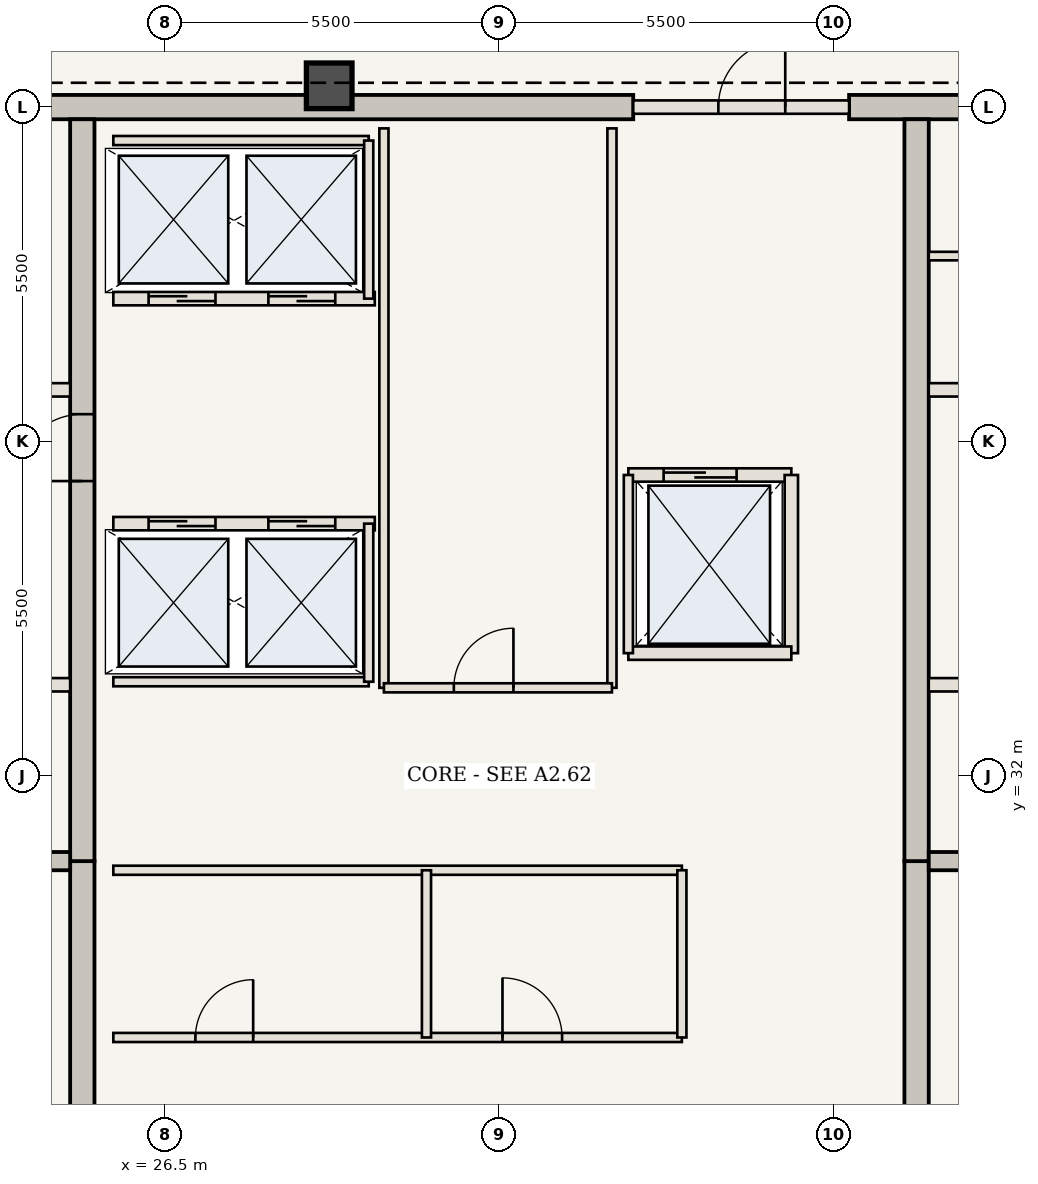
"""IFC4 building model, lengths in metres.
Left out: names, types, materials, properties, quantities, classifications, styles, units other than length and angle.
Written with IfcOpenShell. Run it as: python <this file> out.ifc"""

import sys

from ifc_helpers import new_model, si_unit, direction, frame, frame_2d, origin, origin_2d, place, context, subcontext, project, spatial, rectangle, extrude, element, fill, save


model = new_model("IFC4")
c1 = context("Model", 3, precision=1e-05, world=origin(), true_north=direction((0.0, 1.0)))
c2 = subcontext(c1, "Body", "Model", "MODEL_VIEW")
j1 = project(units=[si_unit("LENGTHUNIT", "METRE"), si_unit("PLANEANGLEUNIT", "RADIAN")], contexts=[c1])
p1 = place(None, origin())
s1 = spatial("IfcSite", under=j1, at=p1, CompositionType="ELEMENT")
p2 = place(p1, origin())
s2 = spatial("IfcBuilding", under=s1, at=p2, CompositionType="ELEMENT")
p3 = place(p2, frame((0.0, 0.0, 289.1)))
s3 = spatial("IfcBuildingStorey", under=s2, at=p3, CompositionType="ELEMENT", Elevation=289.1)
p4 = place(p3, frame((21.41, 43.0, 0.0), z_axis=(0.0, 0.0, 1.0), x_axis=(1.0, 0.0, 0.0)))
e1 = element("IfcWall", 1, at=p4, inside=s3, PredefinedType="SHEAR", context=c2, shape_type="SweptSolid", body=[
    extrude(rectangle(XDim=12.79, YDim=0.4, at=frame_2d((6.395, 0.0))), origin(), (0.0, 0.0, 1.0), 3.85),
])
p5 = place(p3, frame((37.75, 43.0, 0.0), z_axis=(0.0, 0.0, 1.0), x_axis=(1.0, 0.0, 0.0)))
e2 = element("IfcWall", 2, at=p5, inside=s3, PredefinedType="SHEAR", context=c2, shape_type="SweptSolid", body=[
    extrude(rectangle(XDim=4.84, YDim=0.4, at=frame_2d((2.42, 0.0))), origin(), (0.0, 0.0, 1.0), 3.85),
])
p6 = place(p3, frame((25.14, 21.15, 0.0), z_axis=(0.0, 0.0, 1.0), x_axis=(0.0, 1.0, 0.0)))
e3 = element("IfcWall", 3, at=p6, inside=s3, PredefinedType="SHEAR", context=c2, shape_type="SweptSolid", body=[
    extrude(rectangle(XDim=9.45, YDim=0.4, at=frame_2d((4.725, 0.0))), origin(), (0.0, 0.0, 1.0), 3.85),
])
p7 = place(p3, frame((25.14, 30.6, 0.0), z_axis=(0.0, 0.0, 1.0), x_axis=(0.0, 1.0, 0.0)))
e4 = element("IfcWall", 4, at=p7, inside=s3, PredefinedType="SHEAR", context=c2, shape_type="SweptSolid", body=[
    extrude(rectangle(XDim=12.2, YDim=0.4, at=frame_2d((6.1, 0.0))), origin(), (0.0, 0.0, 1.0), 3.85),
])
p8 = place(p7, frame((6.25, 0.0, 0.0)))
e5 = element("IfcOpeningElement", 5, at=p8, cuts=e4, PredefinedType="OPENING", context=c2, shape_type="SweptSolid", body=[
    extrude(rectangle(XDim=1.1, YDim=2.15, at=frame_2d((0.55, 1.075))), frame((0.0, 0.21, 0.0), z_axis=(0.0, -1.0, 0.0), x_axis=(1.0, 0.0, 0.0)), (0.0, 0.0, 1.0), 0.42),
])
p9 = place(p3, frame((38.86, 21.15, 0.0), z_axis=(0.0, 0.0, 1.0), x_axis=(0.0, 1.0, 0.0)))
e6 = element("IfcWall", 6, at=p9, inside=s3, PredefinedType="SHEAR", context=c2, shape_type="SweptSolid", body=[
    extrude(rectangle(XDim=9.45, YDim=0.4, at=frame_2d((4.725, 0.0))), origin(), (0.0, 0.0, 1.0), 3.85),
])
p10 = place(p3, frame((38.86, 30.6, 0.0), z_axis=(0.0, 0.0, 1.0), x_axis=(0.0, 1.0, 0.0)))
e7 = element("IfcWall", 7, at=p10, inside=s3, PredefinedType="SHEAR", context=c2, shape_type="SweptSolid", body=[
    extrude(rectangle(XDim=12.2, YDim=0.4, at=frame_2d((6.1, 0.0))), origin(), (0.0, 0.0, 1.0), 3.85),
])
p11 = place(p3, frame((29.2, 43.35, 0.0), z_axis=(0.0, 0.0, 1.0), x_axis=(1.0, 0.0, 0.0)))
e8 = element("IfcColumn", 8, at=p11, inside=s3, PredefinedType="COLUMN", context=c2, shape_type="SweptSolid", body=[
    extrude(rectangle(XDim=0.75, YDim=0.75, at=origin_2d()), origin(), (0.0, 0.0, 1.0), 3.85),
])
for number, where, z_axis, x_axis in (
    (9, (21.41, 30.6, 0.0), (0.0, 0.0, 1.0), (1.0, 0.0, 0.0)),
    (10, (39.06, 30.6, 0.0), (0.0, 0.0, 1.0), (1.0, 0.0, 0.0)),
):
    element("IfcWall", number, at=place(p3, frame(where, z_axis=z_axis, x_axis=x_axis)), inside=s3, PredefinedType="SHEAR", context=c2, shape_type="SweptSolid", body=[
        extrude(rectangle(XDim=3.53, YDim=0.3, at=frame_2d((1.765, 0.0))), origin(), (0.0, 0.0, 1.0), 3.685),
    ])
p12 = place(p3, frame((21.41, 33.5, 0.0), z_axis=(0.0, 0.0, 1.0), x_axis=(1.0, 0.0, 0.0)))
e11 = element("IfcWall", 11, at=p12, inside=s3, PredefinedType="STANDARD", context=c2, shape_type="SweptSolid", body=[
    extrude(rectangle(XDim=3.53, YDim=0.22, at=frame_2d((1.765, 0.0))), origin(), (0.0, 0.0, 1.0), 3.685),
])
p13 = place(p12, frame((0.75, 0.0, 0.0)))
e12 = element("IfcOpeningElement", 12, at=p13, cuts=e11, PredefinedType="OPENING", context=c2, shape_type="SweptSolid", body=[
    extrude(rectangle(XDim=1.2, YDim=2.2, at=frame_2d((0.6, 1.1))), frame((0.0, 0.12, 0.0), z_axis=(0.0, -1.0, 0.0), x_axis=(1.0, 0.0, 0.0)), (0.0, 0.0, 1.0), 0.24),
])
p14 = place(p3, frame((39.06, 33.5, 0.0), z_axis=(0.0, 0.0, 1.0), x_axis=(1.0, 0.0, 0.0)))
e13 = element("IfcWall", 13, at=p14, inside=s3, PredefinedType="STANDARD", context=c2, shape_type="SweptSolid", body=[
    extrude(rectangle(XDim=3.53, YDim=0.22, at=frame_2d((1.765, 0.0))), origin(), (0.0, 0.0, 1.0), 3.685),
])
p15 = place(p14, frame((1.55, 0.0, 0.0)))
e14 = element("IfcOpeningElement", 14, at=p15, cuts=e13, PredefinedType="OPENING", context=c2, shape_type="SweptSolid", body=[
    extrude(rectangle(XDim=1.2, YDim=2.2, at=frame_2d((0.6, 1.1))), frame((0.0, 0.12, 0.0), z_axis=(0.0, -1.0, 0.0), x_axis=(1.0, 0.0, 0.0)), (0.0, 0.0, 1.0), 0.24),
])
for number, where, z_axis, x_axis in (
    (15, (21.41, 38.35, 0.0), (0.0, 0.0, 1.0), (1.0, 0.0, 0.0)),
    (16, (39.06, 38.35, 0.0), (0.0, 0.0, 1.0), (1.0, 0.0, 0.0)),
):
    element("IfcWall", number, at=place(p3, frame(where, z_axis=z_axis, x_axis=x_axis)), inside=s3, PredefinedType="STANDARD", context=c2, shape_type="SweptSolid", body=[
        extrude(rectangle(XDim=3.53, YDim=0.22, at=frame_2d((1.765, 0.0))), origin(), (0.0, 0.0, 1.0), 3.685),
    ])
p16 = place(p3, frame((39.06, 40.55, 0.0), z_axis=(0.0, 0.0, 1.0), x_axis=(1.0, 0.0, 0.0)))
e17 = element("IfcWall", 17, at=p16, inside=s3, PredefinedType="STANDARD", context=c2, shape_type="SweptSolid", body=[
    extrude(rectangle(XDim=3.53, YDim=0.14, at=frame_2d((1.765, 0.0))), origin(), (0.0, 0.0, 1.0), 3.685),
])
p17 = place(p3, frame((25.65, 27.7, 0.0), z_axis=(0.0, 0.0, 1.0), x_axis=(1.0, 0.0, 0.0)))
e18 = element("IfcWall", 18, at=p17, inside=s3, PredefinedType="STANDARD", context=c2, shape_type="SweptSolid", body=[
    extrude(rectangle(XDim=9.35, YDim=0.15, at=frame_2d((4.675, 0.0))), origin(), (0.0, 0.0, 1.0), 3.685),
])
p18 = place(p17, frame((1.35, 0.0, 0.0)))
e19 = element("IfcOpeningElement", 19, at=p18, cuts=e18, PredefinedType="OPENING", context=c2, shape_type="SweptSolid", body=[
    extrude(rectangle(XDim=0.95, YDim=2.15, at=frame_2d((0.475, 1.075))), frame((0.0, 0.085, 0.0), z_axis=(0.0, -1.0, 0.0), x_axis=(1.0, 0.0, 0.0)), (0.0, 0.0, 1.0), 0.17),
])
p19 = place(p17, frame((6.4, 0.0, 0.0)))
e20 = element("IfcOpeningElement", 20, at=p19, cuts=e18, PredefinedType="OPENING", context=c2, shape_type="SweptSolid", body=[
    extrude(rectangle(XDim=0.98, YDim=2.2, at=frame_2d((0.49, 1.1))), frame((0.0, 0.085, 0.0), z_axis=(0.0, -1.0, 0.0), x_axis=(1.0, 0.0, 0.0)), (0.0, 0.0, 1.0), 0.17),
])
p20 = place(p3, frame((25.65, 30.45, 0.0), z_axis=(0.0, 0.0, 1.0), x_axis=(1.0, 0.0, 0.0)))
e21 = element("IfcWall", 21, at=p20, inside=s3, PredefinedType="STANDARD", context=c2, shape_type="SweptSolid", body=[
    extrude(rectangle(XDim=9.35, YDim=0.15, at=frame_2d((4.675, 0.0))), origin(), (0.0, 0.0, 1.0), 3.685),
])
for number, where, z_axis, x_axis in (
    (22, (30.8, 27.7, 0.0), (0.0, 0.0, 1.0), (0.0, 1.0, 0.0)),
    (23, (35.0, 27.7, 0.0), (0.0, 0.0, 1.0), (0.0, 1.0, 0.0)),
):
    element("IfcWall", number, at=place(p3, frame(where, z_axis=z_axis, x_axis=x_axis)), inside=s3, PredefinedType="STANDARD", context=c2, shape_type="SweptSolid", body=[
        extrude(rectangle(XDim=2.75, YDim=0.15, at=frame_2d((1.375, 0.0))), origin(), (0.0, 0.0, 1.0), 3.685),
    ])
p21 = place(p3, frame((25.65, 36.15, 0.0), z_axis=(0.0, 0.0, 1.0), x_axis=(1.0, 0.0, 0.0)))
e24 = element("IfcWall", 24, at=p21, inside=s3, PredefinedType="STANDARD", context=c2, shape_type="SweptSolid", body=[
    extrude(rectangle(XDim=4.3, YDim=0.22, at=frame_2d((2.15, 0.0))), origin(), (0.0, 0.0, 1.0), 3.685),
])
p22 = place(p21, frame((0.58, 0.0, 0.0)))
e25 = element("IfcOpeningElement", 25, at=p22, cuts=e24, PredefinedType="OPENING", context=c2, shape_type="SweptSolid", body=[
    extrude(rectangle(XDim=1.1, YDim=2.15, at=frame_2d((0.55, 1.075))), frame((0.0, 0.12, 0.0), z_axis=(0.0, -1.0, 0.0), x_axis=(1.0, 0.0, 0.0)), (0.0, 0.0, 1.0), 0.24),
])
p23 = place(p21, frame((2.55, 0.0, 0.0)))
e26 = element("IfcOpeningElement", 26, at=p23, cuts=e24, PredefinedType="OPENING", context=c2, shape_type="SweptSolid", body=[
    extrude(rectangle(XDim=1.1, YDim=2.15, at=frame_2d((0.55, 1.075))), frame((0.0, 0.12, 0.0), z_axis=(0.0, -1.0, 0.0), x_axis=(1.0, 0.0, 0.0)), (0.0, 0.0, 1.0), 0.24),
])
p24 = place(p3, frame((25.65, 33.55, 0.0), z_axis=(0.0, 0.0, 1.0), x_axis=(1.0, 0.0, 0.0)))
e27 = element("IfcWall", 27, at=p24, inside=s3, PredefinedType="STANDARD", context=c2, shape_type="SweptSolid", body=[
    extrude(rectangle(XDim=4.2, YDim=0.15, at=frame_2d((2.1, 0.0))), origin(), (0.0, 0.0, 1.0), 3.685),
])
p25 = place(p3, frame((29.85, 33.55, 0.0), z_axis=(0.0, 0.0, 1.0), x_axis=(0.0, 1.0, 0.0)))
e28 = element("IfcWall", 28, at=p25, inside=s3, PredefinedType="STANDARD", context=c2, shape_type="SweptSolid", body=[
    extrude(rectangle(XDim=2.6, YDim=0.15, at=frame_2d((1.3, 0.0))), origin(), (0.0, 0.0, 1.0), 3.685),
])
p26 = place(p3, frame((25.65, 39.85, 0.0), z_axis=(0.0, 0.0, 1.0), x_axis=(1.0, 0.0, 0.0)))
e29 = element("IfcWall", 29, at=p26, inside=s3, PredefinedType="STANDARD", context=c2, shape_type="SweptSolid", body=[
    extrude(rectangle(XDim=4.3, YDim=0.22, at=frame_2d((2.15, 0.0))), origin(), (0.0, 0.0, 1.0), 3.685),
])
p27 = place(p26, frame((0.58, 0.0, 0.0)))
e30 = element("IfcOpeningElement", 30, at=p27, cuts=e29, PredefinedType="OPENING", context=c2, shape_type="SweptSolid", body=[
    extrude(rectangle(XDim=1.1, YDim=2.15, at=frame_2d((0.55, 1.075))), frame((0.0, 0.12, 0.0), z_axis=(0.0, -1.0, 0.0), x_axis=(1.0, 0.0, 0.0)), (0.0, 0.0, 1.0), 0.24),
])
p28 = place(p26, frame((2.55, 0.0, 0.0)))
e31 = element("IfcOpeningElement", 31, at=p28, cuts=e29, PredefinedType="OPENING", context=c2, shape_type="SweptSolid", body=[
    extrude(rectangle(XDim=1.1, YDim=2.15, at=frame_2d((0.55, 1.075))), frame((0.0, 0.12, 0.0), z_axis=(0.0, -1.0, 0.0), x_axis=(1.0, 0.0, 0.0)), (0.0, 0.0, 1.0), 0.24),
])
p29 = place(p3, frame((25.65, 42.45, 0.0), z_axis=(0.0, 0.0, 1.0), x_axis=(1.0, 0.0, 0.0)))
e32 = element("IfcWall", 32, at=p29, inside=s3, PredefinedType="STANDARD", context=c2, shape_type="SweptSolid", body=[
    extrude(rectangle(XDim=4.2, YDim=0.15, at=frame_2d((2.1, 0.0))), origin(), (0.0, 0.0, 1.0), 3.685),
])
p30 = place(p3, frame((29.85, 39.85, 0.0), z_axis=(0.0, 0.0, 1.0), x_axis=(0.0, 1.0, 0.0)))
e33 = element("IfcWall", 33, at=p30, inside=s3, PredefinedType="STANDARD", context=c2, shape_type="SweptSolid", body=[
    extrude(rectangle(XDim=2.6, YDim=0.15, at=frame_2d((1.3, 0.0))), origin(), (0.0, 0.0, 1.0), 3.685),
])
for number, where, z_axis, x_axis in (
    (34, (30.1, 33.45, 0.0), (0.0, 0.0, 1.0), (0.0, 1.0, 0.0)),
    (35, (33.85, 33.45, 0.0), (0.0, 0.0, 1.0), (0.0, 1.0, 0.0)),
):
    element("IfcWall", number, at=place(p3, frame(where, z_axis=z_axis, x_axis=x_axis)), inside=s3, PredefinedType="STANDARD", context=c2, shape_type="SweptSolid", body=[
        extrude(rectangle(XDim=9.2, YDim=0.15, at=frame_2d((4.6, 0.0))), origin(), (0.0, 0.0, 1.0), 3.685),
    ])
p31 = place(p3, frame((30.1, 33.45, 0.0), z_axis=(0.0, 0.0, 1.0), x_axis=(1.0, 0.0, 0.0)))
e36 = element("IfcWall", 36, at=p31, inside=s3, PredefinedType="STANDARD", context=c2, shape_type="SweptSolid", body=[
    extrude(rectangle(XDim=3.75, YDim=0.15, at=frame_2d((1.875, 0.0))), origin(), (0.0, 0.0, 1.0), 3.685),
])
p32 = place(p31, frame((1.15, 0.0, 0.0)))
e37 = element("IfcOpeningElement", 37, at=p32, cuts=e36, PredefinedType="OPENING", context=c2, shape_type="SweptSolid", body=[
    extrude(rectangle(XDim=0.98, YDim=2.2, at=frame_2d((0.49, 1.1))), frame((0.0, 0.085, 0.0), z_axis=(0.0, -1.0, 0.0), x_axis=(1.0, 0.0, 0.0)), (0.0, 0.0, 1.0), 0.17),
])
p33 = place(p3, frame((34.2, 43.0, 0.0), z_axis=(0.0, 0.0, 1.0), x_axis=(1.0, 0.0, 0.0)))
e38 = element("IfcWall", 38, at=p33, inside=s3, PredefinedType="STANDARD", context=c2, shape_type="SweptSolid", body=[
    extrude(rectangle(XDim=3.55, YDim=0.22, at=frame_2d((1.775, 0.0))), origin(), (0.0, 0.0, 1.0), 3.685),
])
p34 = place(p33, frame((1.4, 0.0, 0.0)))
e39 = element("IfcOpeningElement", 39, at=p34, cuts=e38, PredefinedType="OPENING", context=c2, shape_type="SweptSolid", body=[
    extrude(rectangle(XDim=1.1, YDim=2.15, at=frame_2d((0.55, 1.075))), frame((0.0, 0.12, 0.0), z_axis=(0.0, -1.0, 0.0), x_axis=(1.0, 0.0, 0.0)), (0.0, 0.0, 1.0), 0.24),
])
p35 = place(p3, frame((34.12, 36.95, 0.0), z_axis=(0.0, 0.0, 1.0), x_axis=(1.0, 0.0, 0.0)))
e40 = element("IfcWall", 40, at=p35, inside=s3, PredefinedType="STANDARD", context=c2, shape_type="SweptSolid", body=[
    extrude(rectangle(XDim=2.68, YDim=0.22, at=frame_2d((1.34, 0.0))), origin(), (0.0, 0.0, 1.0), 3.685),
])
p36 = place(p35, frame((0.58, 0.0, 0.0)))
e41 = element("IfcOpeningElement", 41, at=p36, cuts=e40, PredefinedType="OPENING", context=c2, shape_type="SweptSolid", body=[
    extrude(rectangle(XDim=1.2, YDim=2.2, at=frame_2d((0.6, 1.1))), frame((0.0, 0.12, 0.0), z_axis=(0.0, -1.0, 0.0), x_axis=(1.0, 0.0, 0.0)), (0.0, 0.0, 1.0), 0.24),
])
p37 = place(p3, frame((36.8, 34.02, 0.0), z_axis=(0.0, 0.0, 1.0), x_axis=(0.0, 1.0, 0.0)))
e42 = element("IfcWall", 42, at=p37, inside=s3, PredefinedType="STANDARD", context=c2, shape_type="SweptSolid", body=[
    extrude(rectangle(XDim=2.93, YDim=0.22, at=frame_2d((1.465, 0.0))), origin(), (0.0, 0.0, 1.0), 3.685),
])
p38 = place(p3, frame((34.12, 34.02, 0.0), z_axis=(0.0, 0.0, 1.0), x_axis=(1.0, 0.0, 0.0)))
e43 = element("IfcWall", 43, at=p38, inside=s3, PredefinedType="STANDARD", context=c2, shape_type="SweptSolid", body=[
    extrude(rectangle(XDim=2.68, YDim=0.22, at=frame_2d((1.34, 0.0))), origin(), (0.0, 0.0, 1.0), 3.685),
])
p39 = place(p3, frame((34.12, 34.02, 0.0), z_axis=(0.0, 0.0, 1.0), x_axis=(0.0, 1.0, 0.0)))
e44 = element("IfcWall", 44, at=p39, inside=s3, PredefinedType="STANDARD", context=c2, shape_type="SweptSolid", body=[
    extrude(rectangle(XDim=2.93, YDim=0.15, at=frame_2d((1.465, 0.0))), origin(), (0.0, 0.0, 1.0), 3.685),
])
p40 = place(p8, origin())
e45 = element("IfcDoor", 45, at=p40, inside=s3, OperationType="SINGLE_SWING_LEFT", PredefinedType="DOOR", context=c2, shape_type="SweptSolid", body=[
    extrude(rectangle(XDim=1.1, YDim=2.15, at=frame_2d((0.55, 1.075))), frame((0.0, 0.025, 0.0), z_axis=(0.0, -1.0, 0.0), x_axis=(1.0, 0.0, 0.0)), (0.0, 0.0, 1.0), 0.05),
])
fill(e5, e45)
p41 = place(p18, origin())
e46 = element("IfcDoor", 46, at=p41, inside=s3, OperationType="SINGLE_SWING_RIGHT", PredefinedType="DOOR", context=c2, shape_type="SweptSolid", body=[
    extrude(rectangle(XDim=0.95, YDim=2.15, at=frame_2d((0.475, 1.075))), frame((0.0, 0.025, 0.0), z_axis=(0.0, -1.0, 0.0), x_axis=(1.0, 0.0, 0.0)), (0.0, 0.0, 1.0), 0.05),
])
fill(e19, e46)
p42 = place(p19, origin())
e47 = element("IfcDoor", 47, at=p42, inside=s3, OperationType="SINGLE_SWING_LEFT", PredefinedType="DOOR", context=c2, shape_type="SweptSolid", body=[
    extrude(rectangle(XDim=0.98, YDim=2.2, at=frame_2d((0.49, 1.1))), frame((0.0, 0.025, 0.0), z_axis=(0.0, -1.0, 0.0), x_axis=(1.0, 0.0, 0.0)), (0.0, 0.0, 1.0), 0.05),
])
fill(e20, e47)
p43 = place(p22, origin())
e48 = element("IfcDoor", 48, at=p43, inside=s3, OperationType="DOUBLE_DOOR_SLIDING", PredefinedType="DOOR", context=c2, shape_type="SweptSolid", body=[
    extrude(rectangle(XDim=1.1, YDim=2.15, at=frame_2d((0.55, 1.075))), frame((0.0, 0.025, 0.0), z_axis=(0.0, -1.0, 0.0), x_axis=(1.0, 0.0, 0.0)), (0.0, 0.0, 1.0), 0.05),
])
fill(e25, e48)
p44 = place(p23, origin())
e49 = element("IfcDoor", 49, at=p44, inside=s3, OperationType="DOUBLE_DOOR_SLIDING", PredefinedType="DOOR", context=c2, shape_type="SweptSolid", body=[
    extrude(rectangle(XDim=1.1, YDim=2.15, at=frame_2d((0.55, 1.075))), frame((0.0, 0.025, 0.0), z_axis=(0.0, -1.0, 0.0), x_axis=(1.0, 0.0, 0.0)), (0.0, 0.0, 1.0), 0.05),
])
fill(e26, e49)
p45 = place(p27, origin())
e50 = element("IfcDoor", 50, at=p45, inside=s3, OperationType="DOUBLE_DOOR_SLIDING", PredefinedType="DOOR", context=c2, shape_type="SweptSolid", body=[
    extrude(rectangle(XDim=1.1, YDim=2.15, at=frame_2d((0.55, 1.075))), frame((0.0, 0.025, 0.0), z_axis=(0.0, -1.0, 0.0), x_axis=(1.0, 0.0, 0.0)), (0.0, 0.0, 1.0), 0.05),
])
fill(e30, e50)
p46 = place(p28, origin())
e51 = element("IfcDoor", 51, at=p46, inside=s3, OperationType="DOUBLE_DOOR_SLIDING", PredefinedType="DOOR", context=c2, shape_type="SweptSolid", body=[
    extrude(rectangle(XDim=1.1, YDim=2.15, at=frame_2d((0.55, 1.075))), frame((0.0, 0.025, 0.0), z_axis=(0.0, -1.0, 0.0), x_axis=(1.0, 0.0, 0.0)), (0.0, 0.0, 1.0), 0.05),
])
fill(e31, e51)
p47 = place(p32, origin())
e52 = element("IfcDoor", 52, at=p47, inside=s3, OperationType="SINGLE_SWING_RIGHT", PredefinedType="DOOR", context=c2, shape_type="SweptSolid", body=[
    extrude(rectangle(XDim=0.98, YDim=2.2, at=frame_2d((0.49, 1.1))), frame((0.0, 0.025, 0.0), z_axis=(0.0, -1.0, 0.0), x_axis=(1.0, 0.0, 0.0)), (0.0, 0.0, 1.0), 0.05),
])
fill(e37, e52)
p48 = place(p34, origin())
e53 = element("IfcDoor", 53, at=p48, inside=s3, OperationType="SINGLE_SWING_RIGHT", PredefinedType="DOOR", context=c2, shape_type="SweptSolid", body=[
    extrude(rectangle(XDim=1.1, YDim=2.15, at=frame_2d((0.55, 1.075))), frame((0.0, 0.025, 0.0), z_axis=(0.0, -1.0, 0.0), x_axis=(1.0, 0.0, 0.0)), (0.0, 0.0, 1.0), 0.05),
])
fill(e39, e53)
p49 = place(p36, origin())
e54 = element("IfcDoor", 54, at=p49, inside=s3, OperationType="DOUBLE_DOOR_SLIDING", PredefinedType="DOOR", context=c2, shape_type="SweptSolid", body=[
    extrude(rectangle(XDim=1.2, YDim=2.2, at=frame_2d((0.6, 1.1))), frame((0.0, 0.025, 0.0), z_axis=(0.0, -1.0, 0.0), x_axis=(1.0, 0.0, 0.0)), (0.0, 0.0, 1.0), 0.05),
])
fill(e41, e54)
save(model, sys.argv[1])
